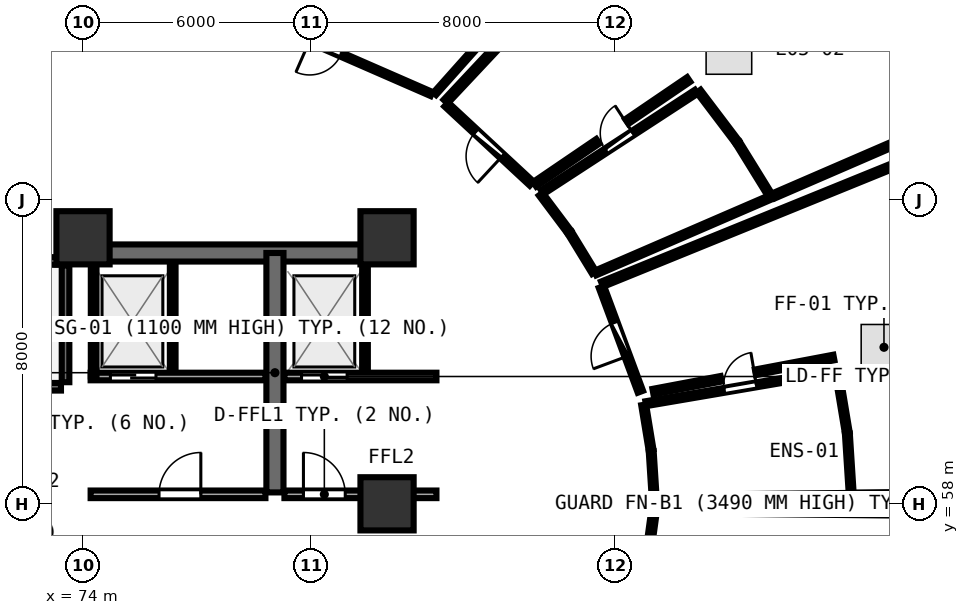
"""IFC4 building model, lengths in metres.
Left out: names, types, materials, properties, quantities, classifications, styles, units other than length and angle.
Written with IfcOpenShell. Run it as: python <this file> out.ifc"""

import sys

from ifc_helpers import new_model, si_unit, direction, frame, frame_2d, origin, origin_2d, place, context, subcontext, project, spatial, rectangle, extrude, element, fill, save


model = new_model("IFC4")
c1 = context("Model", 3, precision=1e-05, world=origin(), true_north=direction((0.0, 1.0)))
c2 = subcontext(c1, "Body", "Model", "MODEL_VIEW")
j1 = project(units=[si_unit("LENGTHUNIT", "METRE"), si_unit("PLANEANGLEUNIT", "RADIAN")], contexts=[c1])
p1 = place(None, origin())
s1 = spatial("IfcSite", under=j1, at=p1, CompositionType="ELEMENT")
p2 = place(p1, origin())
s2 = spatial("IfcBuilding", under=s1, at=p2, CompositionType="ELEMENT")
p3 = place(p2, frame((0.0, 0.0, 22.5)))
s3 = spatial("IfcBuildingStorey", under=s2, at=p3, CompositionType="ELEMENT", Elevation=22.5)
for number, where, z_axis, x_axis in (
    (1, (82.0, 58.0, 0.0), (0.0, 0.0, 1.0), (1.0, 0.0, 0.0)),
    (2, (82.0, 65.0, 0.0), (0.0, 0.0, 1.0), (1.0, 0.0, 0.0)),
    (3, (74.0, 65.0, 0.0), (0.0, 0.0, 1.0), (1.0, 0.0, 0.0)),
):
    element("IfcColumn", number, at=place(p3, frame(where, z_axis=z_axis, x_axis=x_axis)), inside=s3, PredefinedType="PILASTER", context=c2, shape_type="SweptSolid", body=[
        extrude(rectangle(XDim=1.4, YDim=1.4, at=origin_2d()), origin(), (0.0, 0.0, 1.0), 3.75),
    ])
p4 = place(p3, frame((66.26, 61.08, 0.0), z_axis=(0.0, 0.0, 1.0), x_axis=(1.0, 0.0, 0.0)))
e4 = element("IfcWall", 4, at=p4, inside=s3, PredefinedType="SHEAR", context=c2, shape_type="SweptSolid", body=[
    extrude(rectangle(XDim=7.16, YDim=0.2, at=frame_2d((3.58, 0.0))), origin(), (0.0, 0.0, 1.0), 3.49),
])
p5 = place(p3, frame((73.54, 61.2, 0.0), z_axis=(0.0, 0.0, 1.0), x_axis=(0.0, 1.0, 0.0)))
e5 = element("IfcWall", 5, at=p5, inside=s3, PredefinedType="SHEAR", context=c2, shape_type="SweptSolid", body=[
    extrude(rectangle(XDim=3.07, YDim=0.2, at=frame_2d((1.535, 0.0))), origin(), (0.0, 0.0, 1.0), 3.49),
])
p6 = place(p3, frame((73.42, 64.39, 0.0), z_axis=(0.0, 0.0, 1.0), x_axis=(-1.0, 0.0, 0.0)))
e6 = element("IfcWall", 6, at=p6, inside=s3, PredefinedType="SHEAR", context=c2, shape_type="SweptSolid", body=[
    extrude(rectangle(XDim=7.16, YDim=0.2, at=frame_2d((3.58, 0.0))), origin(), (0.0, 0.0, 1.0), 3.49),
])
p7 = place(p3, frame((74.0, 64.6, 0.0), z_axis=(0.0, 0.0, 1.0), x_axis=(1.0, 0.0, 0.0)))
e7 = element("IfcWall", 7, at=p7, inside=s3, PredefinedType="SHEAR", context=c2, shape_type="SweptSolid", body=[
    extrude(rectangle(XDim=8.0, YDim=0.45, at=frame_2d((4.0, 0.0))), origin(), (0.0, 0.0, 1.0), 3.49),
])
p8 = place(p3, frame((79.05, 58.3, 0.0), z_axis=(0.0, 0.0, 1.0), x_axis=(0.0, 1.0, 0.0)))
e8 = element("IfcWall", 8, at=p8, inside=s3, PredefinedType="SHEAR", context=c2, shape_type="SweptSolid", body=[
    extrude(rectangle(XDim=6.3, YDim=0.45, at=frame_2d((3.15, 0.0))), origin(), (0.0, 0.0, 1.0), 3.49),
])
p9 = place(p3, frame((74.2, 61.35, 0.0), z_axis=(0.0, 0.0, 1.0), x_axis=(1.0, 0.0, 0.0)))
e9 = element("IfcWall", 9, at=p9, inside=s3, PredefinedType="SOLIDWALL", context=c2, shape_type="SweptSolid", body=[
    extrude(rectangle(XDim=4.6, YDim=0.2, at=frame_2d((2.3, 0.0))), origin(), (0.0, 0.0, 1.0), 3.48),
])
p10 = place(p9, frame((0.52, 0.0, 0.0)))
e10 = element("IfcOpeningElement", 10, at=p10, cuts=e9, PredefinedType="OPENING", context=c2, shape_type="SweptSolid", body=[
    extrude(rectangle(XDim=1.2, YDim=2.15, at=frame_2d((0.6, 1.075))), frame((0.0, 0.11, 0.0), z_axis=(0.0, -1.0, 0.0), x_axis=(1.0, 0.0, 0.0)), (0.0, 0.0, 1.0), 0.22),
])
p11 = place(p3, frame((74.28, 61.35, 0.0), z_axis=(0.0, 0.0, 1.0), x_axis=(0.0, 1.0, 0.0)))
e11 = element("IfcWall", 11, at=p11, inside=s3, PredefinedType="PARTITIONING", context=c2, shape_type="SweptSolid", body=[
    extrude(rectangle(XDim=2.97, YDim=0.15, at=frame_2d((1.485, 0.0))), origin(), (0.0, 0.0, 1.0), 3.48),
])
p12 = place(p3, frame((76.36, 61.48, 0.0), z_axis=(0.0, 0.0, 1.0), x_axis=(0.0, 1.0, 0.0)))
e12 = element("IfcWall", 12, at=p12, inside=s3, PredefinedType="PARTITIONING", context=c2, shape_type="SweptSolid", body=[
    extrude(rectangle(XDim=2.84, YDim=0.15, at=frame_2d((1.42, 0.0))), origin(), (0.0, 0.0, 1.0), 3.48),
])
p13 = place(p3, frame((79.3, 61.35, 0.0), z_axis=(0.0, 0.0, 1.0), x_axis=(1.0, 0.0, 0.0)))
e13 = element("IfcWall", 13, at=p13, inside=s3, PredefinedType="SOLIDWALL", context=c2, shape_type="SweptSolid", body=[
    extrude(rectangle(XDim=4.0, YDim=0.2, at=frame_2d((2.0, 0.0))), origin(), (0.0, 0.0, 1.0), 2.775),
])
p14 = place(p13, frame((0.45, 0.0, 0.0)))
e14 = element("IfcOpeningElement", 14, at=p14, cuts=e13, PredefinedType="OPENING", context=c2, shape_type="SweptSolid", body=[
    extrude(rectangle(XDim=1.2, YDim=2.15, at=frame_2d((0.6, 1.075))), frame((0.0, 0.11, 0.0), z_axis=(0.0, -1.0, 0.0), x_axis=(1.0, 0.0, 0.0)), (0.0, 0.0, 1.0), 0.22),
])
p15 = place(p3, frame((81.42, 61.48, 0.0), z_axis=(0.0, 0.0, 1.0), x_axis=(0.0, 1.0, 0.0)))
e15 = element("IfcWall", 15, at=p15, inside=s3, PredefinedType="PARTITIONING", context=c2, shape_type="SweptSolid", body=[
    extrude(rectangle(XDim=2.84, YDim=0.15, at=frame_2d((1.42, 0.0))), origin(), (0.0, 0.0, 1.0), 3.48),
])
p16 = place(p3, frame((74.2, 58.25, 0.0), z_axis=(0.0, 0.0, 1.0), x_axis=(1.0, 0.0, 0.0)))
e16 = element("IfcWall", 16, at=p16, inside=s3, PredefinedType="SOLIDWALL", context=c2, shape_type="SweptSolid", body=[
    extrude(rectangle(XDim=4.6, YDim=0.2, at=frame_2d((2.3, 0.0))), origin(), (0.0, 0.0, 1.0), 3.48),
])
p17 = place(p16, frame((1.8, 0.0, 0.0)))
e17 = element("IfcOpeningElement", 17, at=p17, cuts=e16, PredefinedType="OPENING", context=c2, shape_type="SweptSolid", body=[
    extrude(rectangle(XDim=1.1, YDim=2.1, at=frame_2d((0.55, 1.05))), frame((0.0, 0.11, 0.0), z_axis=(0.0, -1.0, 0.0), x_axis=(1.0, 0.0, 0.0)), (0.0, 0.0, 1.0), 0.22),
])
p18 = place(p3, frame((79.3, 58.25, 0.0), z_axis=(0.0, 0.0, 1.0), x_axis=(1.0, 0.0, 0.0)))
e18 = element("IfcWall", 18, at=p18, inside=s3, PredefinedType="SOLIDWALL", context=c2, shape_type="SweptSolid", body=[
    extrude(rectangle(XDim=4.0, YDim=0.2, at=frame_2d((2.0, 0.0))), origin(), (0.0, 0.0, 1.0), 2.775),
])
p19 = place(p18, frame((0.5, 0.0, 0.0)))
e19 = element("IfcOpeningElement", 19, at=p19, cuts=e18, PredefinedType="OPENING", context=c2, shape_type="SweptSolid", body=[
    extrude(rectangle(XDim=1.1, YDim=2.1, at=frame_2d((0.55, 1.05))), frame((0.0, 0.11, 0.0), z_axis=(0.0, -1.0, 0.0), x_axis=(1.0, 0.0, 0.0)), (0.0, 0.0, 1.0), 0.22),
])
p20 = place(p3, frame((88.808, 60.634, 0.0), z_axis=(0.0, 0.0, 1.0), x_axis=(0.985746995542, 0.168234540986, 0.0)))
e20 = element("IfcWall", 20, at=p20, inside=s3, PredefinedType="PLUMBINGWALL", context=c2, shape_type="SweptSolid", body=[
    extrude(rectangle(XDim=5.046, YDim=0.13, at=frame_2d((2.523, 0.0))), origin(), (0.0, 0.0, 1.0), 3.175),
])
p21 = place(p20, frame((2.093, 0.0, 0.0)))
e21 = element("IfcOpeningElement", 21, at=p21, cuts=e20, PredefinedType="OPENING", context=c2, shape_type="SweptSolid", body=[
    extrude(rectangle(XDim=0.86, YDim=2.05, at=frame_2d((0.43, 1.025))), frame((0.0, 0.075, 0.0), z_axis=(0.0, -1.0, 0.0), x_axis=(1.0, 0.0, 0.0)), (0.0, 0.0, 1.0), 0.15),
])
p22 = place(p3, frame((88.667, 60.948, 0.0), z_axis=(0.0, 0.0, 1.0), x_axis=(-0.348640514247, 0.937256524024, 0.0)))
e22 = element("IfcWall", 22, at=p22, inside=s3, PredefinedType="PARTITIONING", context=c2, shape_type="SweptSolid", body=[
    extrude(rectangle(XDim=2.943, YDim=0.15, at=frame_2d((1.472, 0.0))), origin(), (0.0, 0.0, 1.0), 3.48),
])
p23 = place(p22, frame((0.997, 0.0, 0.0)))
e23 = element("IfcOpeningElement", 23, at=p23, cuts=e22, PredefinedType="OPENING", context=c2, shape_type="SweptSolid", body=[
    extrude(rectangle(XDim=0.95, YDim=2.08, at=frame_2d((0.475, 1.04))), frame((0.0, 0.085, 0.0), z_axis=(0.0, -1.0, 0.0), x_axis=(1.0, 0.0, 0.0)), (0.0, 0.0, 1.0), 0.17),
])
p24 = place(p3, frame((86.083, 66.2, 0.0), z_axis=(0.0, 0.0, 1.0), x_axis=(0.837796261941, 0.545982988267, 0.0)))
e24 = element("IfcWall", 24, at=p24, inside=s3, PredefinedType="PLUMBINGWALL", context=c2, shape_type="SweptSolid", body=[
    extrude(rectangle(XDim=4.838, YDim=0.13, at=frame_2d((2.419, 0.0))), origin(), (0.0, 0.0, 1.0), 3.235),
])
p25 = place(p24, frame((1.989, 0.0, 0.0)))
e25 = element("IfcOpeningElement", 25, at=p25, cuts=e24, PredefinedType="OPENING", context=c2, shape_type="SweptSolid", body=[
    extrude(rectangle(XDim=0.86, YDim=2.05, at=frame_2d((0.43, 1.025))), frame((0.0, 0.075, 0.0), z_axis=(0.0, -1.0, 0.0), x_axis=(1.0, 0.0, 0.0)), (0.0, 0.0, 1.0), 0.15),
])
p26 = place(p3, frame((85.806, 66.425, 0.0), z_axis=(0.0, 0.0, 1.0), x_axis=(-0.7329267348, 0.680307578538, 0.0)))
e26 = element("IfcWall", 26, at=p26, inside=s3, PredefinedType="PARTITIONING", context=c2, shape_type="SweptSolid", body=[
    extrude(rectangle(XDim=3.067, YDim=0.15, at=frame_2d((1.533, 0.0))), origin(), (0.0, 0.0, 1.0), 2.875),
])
p27 = place(p26, frame((1.059, 0.0, 0.0)))
e27 = element("IfcOpeningElement", 27, at=p27, cuts=e26, PredefinedType="OPENING", context=c2, shape_type="SweptSolid", body=[
    extrude(rectangle(XDim=0.95, YDim=2.08, at=frame_2d((0.475, 1.04))), frame((0.0, 0.085, 0.0), z_axis=(0.0, -1.0, 0.0), x_axis=(1.0, 0.0, 0.0)), (0.0, 0.0, 1.0), 0.17),
])
p28 = place(p3, frame((83.172, 68.783, 0.0), z_axis=(0.0, 0.0, 1.0), x_axis=(-0.916419655578, 0.400218708797, 0.0)))
e28 = element("IfcWall", 28, at=p28, inside=s3, PredefinedType="PARTITIONING", context=c2, shape_type="SweptSolid", body=[
    extrude(rectangle(XDim=6.104, YDim=0.12, at=frame_2d((3.052, 0.0))), origin(), (0.0, 0.0, 1.0), 2.875),
])
p29 = place(p28, frame((2.602, 0.0, 0.0)))
e29 = element("IfcOpeningElement", 29, at=p29, cuts=e28, PredefinedType="OPENING", context=c2, shape_type="SweptSolid", body=[
    extrude(rectangle(XDim=0.9, YDim=2.08, at=frame_2d((0.45, 1.04))), frame((0.0, 0.07, 0.0), z_axis=(0.0, -1.0, 0.0), x_axis=(1.0, 0.0, 0.0)), (0.0, 0.0, 1.0), 0.14),
])
p30 = place(p3, frame((88.625, 54.885, 0.0), z_axis=(0.0, 0.0, 1.0), x_axis=(0.135838186105, 0.990731036758, 0.0)))
e30 = element("IfcWall", 30, at=p30, inside=s3, PredefinedType="PARTITIONING", context=c2, shape_type="SweptSolid", body=[
    extrude(rectangle(XDim=2.915, YDim=0.15, at=frame_2d((1.458, 0.0))), origin(), (0.0, 0.0, 1.0), 3.48),
])
p31 = place(p30, frame((0.983, 0.0, 0.0)))
e31 = element("IfcOpeningElement", 31, at=p31, cuts=e30, PredefinedType="OPENING", context=c2, shape_type="SweptSolid", body=[
    extrude(rectangle(XDim=0.95, YDim=2.08, at=frame_2d((0.475, 1.04))), frame((0.0, 0.085, 0.0), z_axis=(0.0, -1.0, 0.0), x_axis=(1.0, 0.0, 0.0)), (0.0, 0.0, 1.0), 0.17),
])
p32 = place(p3, frame((89.028, 58.187, 0.0), z_axis=(0.0, 0.0, 1.0), x_axis=(-0.063661240763, 0.99797156594, 0.0)))
e32 = element("IfcWall", 32, at=p32, inside=s3, PredefinedType="PLUMBINGWALL", context=c2, shape_type="SweptSolid", body=[
    extrude(rectangle(XDim=1.197, YDim=0.13, at=frame_2d((0.598, 0.0))), origin(), (0.0, 0.0, 1.0), 2.875),
])
p33 = place(p3, frame((88.947, 59.421, 0.0), z_axis=(0.0, 0.0, 1.0), x_axis=(-0.162220174474, 0.986754587014, 0.0)))
e33 = element("IfcWall", 33, at=p33, inside=s3, PredefinedType="PLUMBINGWALL", context=c2, shape_type="SweptSolid", body=[
    extrude(rectangle(XDim=1.199, YDim=0.13, at=frame_2d((0.6, 0.0))), origin(), (0.0, 0.0, 1.0), 3.48),
])
p34 = place(p3, frame((93.844, 61.473, 0.0), z_axis=(0.0, 0.0, 1.0), x_axis=(0.16417773594, -0.986430773558, 0.0)))
e34 = element("IfcWall", 34, at=p34, inside=s3, PredefinedType="PLUMBINGWALL", context=c2, shape_type="SweptSolid", body=[
    extrude(rectangle(XDim=1.611, YDim=0.13, at=frame_2d((0.805, 0.0))), origin(), (0.0, 0.0, 1.0), 3.48),
])
p35 = place(p3, frame((94.113, 59.845, 0.0), z_axis=(0.0, 0.0, 1.0), x_axis=(0.06383542257, -0.997960439509, 0.0)))
e35 = element("IfcWall", 35, at=p35, inside=s3, PredefinedType="PLUMBINGWALL", context=c2, shape_type="SweptSolid", body=[
    extrude(rectangle(XDim=1.606, YDim=0.13, at=frame_2d((0.803, 0.0))), origin(), (0.0, 0.0, 1.0), 3.48),
])
p36 = place(p3, frame((94.197, 58.222, 0.0), z_axis=(0.0, 0.0, 1.0), x_axis=(-0.999944081579, -0.010575146078, 0.0)))
e36 = element("IfcWall", 36, at=p36, inside=s3, PredefinedType="PLUMBINGWALL", context=c2, shape_type="SweptSolid", body=[
    extrude(rectangle(XDim=5.148, YDim=0.13, at=frame_2d((2.574, 0.0))), origin(), (0.0, 0.0, 1.0), 2.875),
])
p37 = place(p3, frame((87.657, 63.778, 0.0), z_axis=(0.0, 0.0, 1.0), x_axis=(0.926333713065, 0.376703931542, 0.0)))
e37 = element("IfcWall", 37, at=p37, inside=s3, PredefinedType="PARTITIONING", context=c2, shape_type="SweptSolid", body=[
    extrude(rectangle(XDim=12.099, YDim=0.15, at=frame_2d((6.05, 0.0))), origin(), (0.0, 0.0, 1.0), 2.875),
])
p38 = place(p3, frame((100.36, 58.287, 0.0), z_axis=(0.0, 0.0, 1.0), x_axis=(-0.999943071294, -0.010670246996, 0.0)))
e38 = element("IfcWall", 38, at=p38, inside=s3, PredefinedType="PARTITIONING", context=c2, shape_type="SweptSolid", body=[
    extrude(rectangle(XDim=6.063, YDim=0.15, at=frame_2d((3.032, 0.0))), origin(), (0.0, 0.0, 1.0), 3.235),
])
p39 = place(p3, frame((93.759, 61.851, 0.0), z_axis=(0.0, 0.0, 1.0), x_axis=(-0.98260291219, -0.185718919219, 0.0)))
e39 = element("IfcWall", 39, at=p39, inside=s3, PredefinedType="PARTITIONING", context=c2, shape_type="SweptSolid", body=[
    extrude(rectangle(XDim=2.102, YDim=0.15, at=frame_2d((1.051, 0.0))), origin(), (0.0, 0.0, 1.0), 3.175),
])
p40 = place(p3, frame((90.789, 61.289, 0.0), z_axis=(0.0, 0.0, 1.0), x_axis=(-0.98259072308, -0.185783397852, 0.0)))
e40 = element("IfcWall", 40, at=p40, inside=s3, PredefinedType="PARTITIONING", context=c2, shape_type="SweptSolid", body=[
    extrude(rectangle(XDim=1.824, YDim=0.15, at=frame_2d((0.912, 0.0))), origin(), (0.0, 0.0, 1.0), 3.235),
])
p41 = place(p3, frame((87.451, 64.08, 0.0), z_axis=(0.0, 0.0, 1.0), x_axis=(-0.52146609248, 0.853272004928, 0.0)))
e41 = element("IfcWall", 41, at=p41, inside=s3, PredefinedType="PLUMBINGWALL", context=c2, shape_type="SweptSolid", body=[
    extrude(rectangle(XDim=1.228, YDim=0.13, at=frame_2d((0.614, 0.0))), origin(), (0.0, 0.0, 1.0), 3.48),
])
p42 = place(p3, frame((86.788, 65.161, 0.0), z_axis=(0.0, 0.0, 1.0), x_axis=(-0.600347056143, 0.79973959023, 0.0)))
e42 = element("IfcWall", 42, at=p42, inside=s3, PredefinedType="PLUMBINGWALL", context=c2, shape_type="SweptSolid", body=[
    extrude(rectangle(XDim=1.238, YDim=0.13, at=frame_2d((0.619, 0.0))), origin(), (0.0, 0.0, 1.0), 2.875),
])
p43 = place(p3, frame((90.199, 68.858, 0.0), z_axis=(0.0, 0.0, 1.0), x_axis=(0.60376191721, -0.797164692725, 0.0)))
e43 = element("IfcWall", 43, at=p43, inside=s3, PredefinedType="PLUMBINGWALL", context=c2, shape_type="SweptSolid", body=[
    extrude(rectangle(XDim=1.669, YDim=0.13, at=frame_2d((0.834, 0.0))), origin(), (0.0, 0.0, 1.0), 3.175),
])
p44 = place(p3, frame((91.229, 67.495, 0.0), z_axis=(0.0, 0.0, 1.0), x_axis=(0.525540089642, -0.850768837099, 0.0)))
e44 = element("IfcWall", 44, at=p44, inside=s3, PredefinedType="PLUMBINGWALL", context=c2, shape_type="SweptSolid", body=[
    extrude(rectangle(XDim=1.651, YDim=0.13, at=frame_2d((0.826, 0.0))), origin(), (0.0, 0.0, 1.0), 3.175),
])
p45 = place(p3, frame((92.09, 66.065, 0.0), z_axis=(0.0, 0.0, 1.0), x_axis=(-0.917797204715, -0.397049481826, 0.0)))
e45 = element("IfcWall", 45, at=p45, inside=s3, PredefinedType="PLUMBINGWALL", context=c2, shape_type="SweptSolid", body=[
    extrude(rectangle(XDim=5.023, YDim=0.13, at=frame_2d((2.511, 0.0))), origin(), (0.0, 0.0, 1.0), 2.875),
])
p46 = place(p3, frame((83.542, 68.581, 0.0), z_axis=(0.0, 0.0, 1.0), x_axis=(0.684261294523, 0.729236916796, 0.0)))
e46 = element("IfcWall", 46, at=p46, inside=s3, PredefinedType="PARTITIONING", context=c2, shape_type="SweptSolid", body=[
    extrude(rectangle(XDim=11.438, YDim=0.15, at=frame_2d((5.719, 0.0))), origin(), (0.0, 0.0, 1.0), 2.875),
])
p47 = place(p3, frame((98.574, 68.874, 0.0), z_axis=(0.0, 0.0, 1.0), x_axis=(-0.917736225937, -0.397190407239, 0.0)))
e47 = element("IfcWall", 47, at=p47, inside=s3, PredefinedType="PARTITIONING", context=c2, shape_type="SweptSolid", body=[
    extrude(rectangle(XDim=6.967, YDim=0.15, at=frame_2d((3.483, 0.0))), origin(), (0.0, 0.0, 1.0), 2.875),
])
p48 = place(p3, frame((89.939, 69.166, 0.0), z_axis=(0.0, 0.0, 1.0), x_axis=(-0.826811291248, -0.562479411769, 0.0)))
e48 = element("IfcWall", 48, at=p48, inside=s3, PredefinedType="PARTITIONING", context=c2, shape_type="SweptSolid", body=[
    extrude(rectangle(XDim=1.971, YDim=0.15, at=frame_2d((0.985, 0.0))), origin(), (0.0, 0.0, 1.0), 3.48),
])
p49 = place(p3, frame((87.549, 67.539, 0.0), z_axis=(0.0, 0.0, 1.0), x_axis=(-0.826867883695, -0.562396215237, 0.0)))
e49 = element("IfcWall", 49, at=p49, inside=s3, PredefinedType="PARTITIONING", context=c2, shape_type="SweptSolid", body=[
    extrude(rectangle(XDim=2.014, YDim=0.15, at=frame_2d((1.007, 0.0))), origin(), (0.0, 0.0, 1.0), 3.235),
])
p50 = place(p3, frame((90.844, 77.294, 0.0), z_axis=(0.0, 0.0, 1.0), x_axis=(-0.66580890104, -0.746122313897, 0.0)))
e50 = element("IfcWall", 50, at=p50, inside=s3, PredefinedType="PARTITIONING", context=c2, shape_type="SweptSolid", body=[
    extrude(rectangle(XDim=11.399, YDim=0.1, at=frame_2d((5.7, 0.0))), origin(), (0.0, 0.0, 1.0), 2.875),
])
p51 = place(p3, frame((89.069, 57.833, 0.0), z_axis=(0.0, 0.0, 1.0), x_axis=(0.999943877154, -0.010594458135, 0.0)))
e51 = element("IfcWall", 51, at=p51, inside=s3, PredefinedType="PARTITIONING", context=c2, shape_type="SweptSolid", body=[
    extrude(rectangle(XDim=11.292, YDim=0.15, at=frame_2d((5.646, 0.0))), origin(), (0.0, 0.0, 1.0), 2.875),
])
p52 = place(p10, origin())
e52 = element("IfcDoor", 52, at=p52, inside=s3, OperationType="DOUBLE_DOOR_SLIDING", PredefinedType="DOOR", context=c2, shape_type="SweptSolid", body=[
    extrude(rectangle(XDim=1.2, YDim=2.15, at=frame_2d((0.6, 1.075))), frame((0.0, 0.025, 0.0), z_axis=(0.0, -1.0, 0.0), x_axis=(1.0, 0.0, 0.0)), (0.0, 0.0, 1.0), 0.05),
])
fill(e10, e52)
p53 = place(p14, origin())
e53 = element("IfcDoor", 53, at=p53, inside=s3, OperationType="DOUBLE_DOOR_SLIDING", PredefinedType="DOOR", context=c2, shape_type="SweptSolid", body=[
    extrude(rectangle(XDim=1.2, YDim=2.15, at=frame_2d((0.6, 1.075))), frame((0.0, 0.025, 0.0), z_axis=(0.0, -1.0, 0.0), x_axis=(1.0, 0.0, 0.0)), (0.0, 0.0, 1.0), 0.05),
])
fill(e14, e53)
p54 = place(p17, frame((1.1, 0.0, 0.0), z_axis=(0.0, 0.0, 1.0), x_axis=(-1.0, 0.0, 0.0)))
e54 = element("IfcDoor", 54, at=p54, inside=s3, OperationType="SINGLE_SWING_LEFT", PredefinedType="DOOR", context=c2, shape_type="SweptSolid", body=[
    extrude(rectangle(XDim=1.1, YDim=2.1, at=frame_2d((0.55, 1.05))), frame((0.0, 0.025, 0.0), z_axis=(0.0, -1.0, 0.0), x_axis=(1.0, 0.0, 0.0)), (0.0, 0.0, 1.0), 0.05),
])
fill(e17, e54)
p55 = place(p19, frame((1.1, 0.0, 0.0), z_axis=(0.0, 0.0, 1.0), x_axis=(-1.0, 0.0, 0.0)))
e55 = element("IfcDoor", 55, at=p55, inside=s3, OperationType="SINGLE_SWING_RIGHT", PredefinedType="DOOR", context=c2, shape_type="SweptSolid", body=[
    extrude(rectangle(XDim=1.1, YDim=2.1, at=frame_2d((0.55, 1.05))), frame((0.0, 0.025, 0.0), z_axis=(0.0, -1.0, 0.0), x_axis=(1.0, 0.0, 0.0)), (0.0, 0.0, 1.0), 0.05),
])
fill(e19, e55)
p56 = place(p21, origin())
e56 = element("IfcDoor", 56, at=p56, inside=s3, OperationType="SINGLE_SWING_RIGHT", PredefinedType="DOOR", context=c2, shape_type="SweptSolid", body=[
    extrude(rectangle(XDim=0.86, YDim=2.05, at=frame_2d((0.43, 1.025))), frame((0.0, 0.025, 0.0), z_axis=(0.0, -1.0, 0.0), x_axis=(1.0, 0.0, 0.0)), (0.0, 0.0, 1.0), 0.05),
])
fill(e21, e56)
p57 = place(p23, origin())
e57 = element("IfcDoor", 57, at=p57, inside=s3, OperationType="SINGLE_SWING_LEFT", PredefinedType="DOOR", context=c2, shape_type="SweptSolid", body=[
    extrude(rectangle(XDim=0.95, YDim=2.08, at=frame_2d((0.475, 1.04))), frame((0.0, 0.025, 0.0), z_axis=(0.0, -1.0, 0.0), x_axis=(1.0, 0.0, 0.0)), (0.0, 0.0, 1.0), 0.05),
])
fill(e23, e57)
p58 = place(p25, origin())
e58 = element("IfcDoor", 58, at=p58, inside=s3, OperationType="SINGLE_SWING_RIGHT", PredefinedType="DOOR", context=c2, shape_type="SweptSolid", body=[
    extrude(rectangle(XDim=0.86, YDim=2.05, at=frame_2d((0.43, 1.025))), frame((0.0, 0.025, 0.0), z_axis=(0.0, -1.0, 0.0), x_axis=(1.0, 0.0, 0.0)), (0.0, 0.0, 1.0), 0.05),
])
fill(e25, e58)
p59 = place(p27, origin())
e59 = element("IfcDoor", 59, at=p59, inside=s3, OperationType="SINGLE_SWING_LEFT", PredefinedType="DOOR", context=c2, shape_type="SweptSolid", body=[
    extrude(rectangle(XDim=0.95, YDim=2.08, at=frame_2d((0.475, 1.04))), frame((0.0, 0.025, 0.0), z_axis=(0.0, -1.0, 0.0), x_axis=(1.0, 0.0, 0.0)), (0.0, 0.0, 1.0), 0.05),
])
fill(e27, e59)
p60 = place(p29, origin())
e60 = element("IfcDoor", 60, at=p60, inside=s3, OperationType="SINGLE_SWING_RIGHT", PredefinedType="DOOR", context=c2, shape_type="SweptSolid", body=[
    extrude(rectangle(XDim=0.9, YDim=2.08, at=frame_2d((0.45, 1.04))), frame((0.0, 0.025, 0.0), z_axis=(0.0, -1.0, 0.0), x_axis=(1.0, 0.0, 0.0)), (0.0, 0.0, 1.0), 0.05),
])
fill(e29, e60)
save(model, sys.argv[1])
